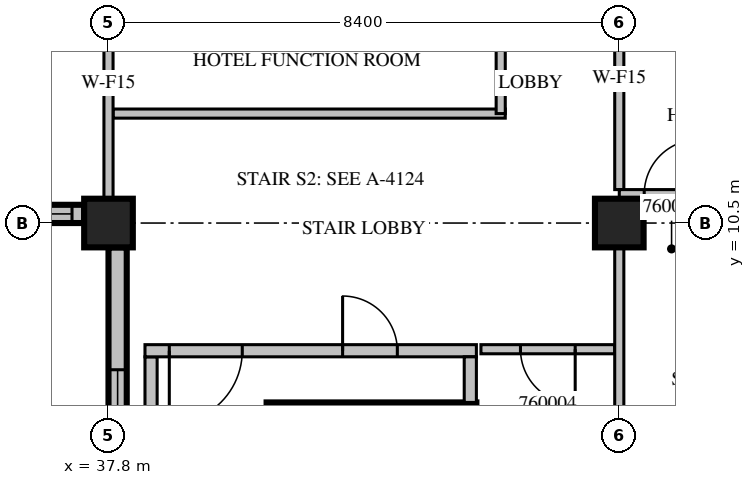
"""IFC4 building model, lengths in metres.
Left out: names, types, materials, properties, quantities, classifications, styles, units other than length and angle.
Written with IfcOpenShell. Run it as: python <this file> out.ifc"""

import sys

from ifc_helpers import new_model, si_unit, direction, frame, frame_2d, origin, origin_2d, place, context, subcontext, project, spatial, rectangle, extrude, source, transform, mapped, element, fill, save


model = new_model("IFC4")
c1 = context("Model", 3, precision=1e-05, world=origin(), true_north=direction((0.0, 1.0)))
c2 = subcontext(c1, "Body", "Model", "MODEL_VIEW")
j1 = project(units=[si_unit("LENGTHUNIT", "METRE"), si_unit("PLANEANGLEUNIT", "RADIAN")], contexts=[c1])
p1 = place(None, origin())
s1 = spatial("IfcSite", under=j1, at=p1, CompositionType="ELEMENT")
p2 = place(p1, origin())
s2 = spatial("IfcBuilding", under=s1, at=p2, CompositionType="ELEMENT")
p3 = place(p2, frame((0.0, 0.0, 261.4)))
s3 = spatial("IfcBuildingStorey", under=s2, at=p3, CompositionType="ELEMENT", Elevation=261.4)
m1 = source(origin(), c2, "Body", "SweptSolid", [
    extrude(rectangle(XDim=0.8, YDim=0.8, at=origin_2d()), origin(), (0.0, 0.0, 1.0), 3.8),
])
for number, where, z_axis, x_axis in (
    (1, (37.8, 10.5, 0.0), (0.0, 0.0, 1.0), (1.0, 0.0, 0.0)),
    (2, (46.2, 10.5, 0.0), (0.0, 0.0, 1.0), (1.0, 0.0, 0.0)),
):
    element("IfcColumn", number, at=place(p3, frame(where, z_axis=z_axis, x_axis=x_axis)), inside=s3, PredefinedType="COLUMN", context=c2, shape_type="MappedRepresentation", body=[
        mapped(m1, transform((0.0, 0.0, 0.0), scale=1.0)),
    ])
m2 = source(origin(), c2, "Body", "SweptSolid", [
    extrude(rectangle(XDim=7.6, YDim=0.3, at=frame_2d((3.8, 0.0))), origin(), (0.0, 0.0, 1.0), 3.4),
])
p4 = place(p3, frame((29.8, 10.65, 0.0), z_axis=(0.0, 0.0, 1.0), x_axis=(1.0, 0.0, 0.0)))
e3 = element("IfcWall", 3, at=p4, inside=s3, PredefinedType="STANDARD", context=c2, shape_type="MappedRepresentation", body=[
    mapped(m2, transform((0.0, 0.0, 0.0), scale=1.0)),
])
m3 = source(origin(), c2, "Body", "SweptSolid", [
    extrude(rectangle(XDim=1.2, YDim=2.3, at=frame_2d((0.6, 1.15))), frame((0.0, 0.16, 0.0), z_axis=(0.0, -1.0, 0.0), x_axis=(1.0, 0.0, 0.0)), (0.0, 0.0, 1.0), 0.32),
])
p5 = place(p4, frame((1.601, 0.0, 0.6)))
e4 = element("IfcOpeningElement", 4, at=p5, cuts=e3, PredefinedType="OPENING", context=c2, shape_type="MappedRepresentation", body=[
    mapped(m3, transform((0.0, 0.0, 0.0), scale=1.0)),
])
m4 = source(origin(), c2, "Body", "SweptSolid", [
    extrude(rectangle(XDim=3.0, YDim=2.3, at=frame_2d((1.5, 1.15))), frame((0.0, 0.16, 0.0), z_axis=(0.0, -1.0, 0.0), x_axis=(1.0, 0.0, 0.0)), (0.0, 0.0, 1.0), 0.32),
])
p6 = place(p4, frame((4.4, 0.0, 0.6)))
e5 = element("IfcOpeningElement", 5, at=p6, cuts=e3, PredefinedType="OPENING", context=c2, shape_type="MappedRepresentation", body=[
    mapped(m4, transform((0.0, 0.0, 0.0), scale=1.0)),
])
m5 = source(origin(), c2, "Body", "SweptSolid", [
    extrude(rectangle(XDim=9.3, YDim=0.3, at=frame_2d((4.65, 0.0))), origin(), (0.0, 0.0, 1.0), 3.4),
])
p7 = place(p3, frame((37.95, 10.1, 0.0), z_axis=(0.0, 0.0, 1.0), x_axis=(0.0, -1.0, 0.0)))
e6 = element("IfcWall", 6, at=p7, inside=s3, PredefinedType="STANDARD", context=c2, shape_type="MappedRepresentation", body=[
    mapped(m5, transform((0.0, 0.0, 0.0), scale=1.0)),
])
m6 = source(origin(), c2, "Body", "SweptSolid", [
    extrude(rectangle(XDim=1.8, YDim=2.3, at=frame_2d((0.9, 1.15))), frame((0.0, 0.16, 0.0), z_axis=(0.0, -1.0, 0.0), x_axis=(1.0, 0.0, 0.0)), (0.0, 0.0, 1.0), 0.32),
])
p8 = place(p7, frame((2.013, 0.0, 0.6)))
e7 = element("IfcOpeningElement", 7, at=p8, cuts=e6, PredefinedType="OPENING", context=c2, shape_type="MappedRepresentation", body=[
    mapped(m6, transform((0.0, 0.0, 0.0), scale=1.0)),
])
p9 = place(p7, frame((5.975, 0.0, 0.6)))
e8 = element("IfcOpeningElement", 8, at=p9, cuts=e6, PredefinedType="OPENING", context=c2, shape_type="MappedRepresentation", body=[
    mapped(m4, transform((0.0, 0.0, 0.0), scale=1.0)),
])
m7 = source(origin(), c2, "Body", "SweptSolid", [
    extrude(rectangle(XDim=3.45, YDim=0.25, at=frame_2d((1.725, 0.0))), origin(), (0.0, 0.0, 1.0), 3.4),
])
p10 = place(p3, frame((40.4, 7.425, 0.0), z_axis=(0.0, 0.0, 1.0), x_axis=(1.0, 0.0, 0.0)))
e9 = element("IfcWall", 9, at=p10, inside=s3, PredefinedType="SOLIDWALL", context=c2, shape_type="MappedRepresentation", body=[
    mapped(m7, transform((0.0, 0.0, 0.0), scale=1.0)),
])
m8 = source(origin(), c2, "Body", "SweptSolid", [
    extrude(rectangle(XDim=8.0, YDim=0.2, at=frame_2d((4.0, 0.0))), origin(), (0.0, 0.0, 1.0), 3.4),
])
p11 = place(p3, frame((38.5, 0.3, 0.0), z_axis=(0.0, 0.0, 1.0), x_axis=(0.0, 1.0, 0.0)))
e10 = element("IfcWall", 10, at=p11, inside=s3, PredefinedType="PARTITIONING", context=c2, shape_type="MappedRepresentation", body=[
    mapped(m8, transform((0.0, 0.0, 0.0), scale=1.0)),
])
m9 = source(origin(), c2, "Body", "SweptSolid", [
    extrude(rectangle(XDim=5.45, YDim=0.2, at=frame_2d((2.725, 0.0))), origin(), (0.0, 0.0, 1.0), 3.4),
])
p12 = place(p3, frame((38.4, 8.4, 0.0), z_axis=(0.0, 0.0, 1.0), x_axis=(1.0, 0.0, 0.0)))
e11 = element("IfcWall", 11, at=p12, inside=s3, PredefinedType="PARTITIONING", context=c2, shape_type="MappedRepresentation", body=[
    mapped(m9, transform((0.0, 0.0, 0.0), scale=1.0)),
])
m10 = source(origin(), c2, "Body", "SweptSolid", [
    extrude(rectangle(XDim=1.2, YDim=2.1, at=frame_2d((0.6, 1.05))), frame((0.0, 0.11, 0.0), z_axis=(0.0, -1.0, 0.0), x_axis=(1.0, 0.0, 0.0)), (0.0, 0.0, 1.0), 0.22),
])
p13 = place(p12, frame((0.4, 0.0, 0.0)))
e12 = element("IfcOpeningElement", 12, at=p13, cuts=e11, PredefinedType="OPENING", context=c2, shape_type="MappedRepresentation", body=[
    mapped(m10, transform((0.0, 0.0, 0.0), scale=1.0)),
])
m11 = source(origin(), c2, "Body", "SweptSolid", [
    extrude(rectangle(XDim=0.9, YDim=2.1, at=frame_2d((0.45, 1.05))), frame((0.0, 0.11, 0.0), z_axis=(0.0, -1.0, 0.0), x_axis=(1.0, 0.0, 0.0)), (0.0, 0.0, 1.0), 0.22),
])
p14 = place(p12, frame((3.25, 0.0, 0.0)))
e13 = element("IfcOpeningElement", 13, at=p14, cuts=e11, PredefinedType="OPENING", context=c2, shape_type="MappedRepresentation", body=[
    mapped(m11, transform((0.0, 0.0, 0.0), scale=1.0)),
])
m12 = source(origin(), c2, "Body", "SweptSolid", [
    extrude(rectangle(XDim=0.75, YDim=0.2, at=frame_2d((0.375, 0.0))), origin(), (0.0, 0.0, 1.0), 3.4),
])
p15 = place(p3, frame((43.75, 7.55, 0.0), z_axis=(0.0, 0.0, 1.0), x_axis=(0.0, 1.0, 0.0)))
e14 = element("IfcWall", 14, at=p15, inside=s3, PredefinedType="PARTITIONING", context=c2, shape_type="MappedRepresentation", body=[
    mapped(m12, transform((0.0, 0.0, 0.0), scale=1.0)),
])
m13 = source(origin(), c2, "Body", "SweptSolid", [
    extrude(rectangle(XDim=6.45, YDim=0.15, at=frame_2d((3.225, 0.0))), origin(), (0.0, 0.0, 1.0), 3.4),
])
p16 = place(p3, frame((37.875, 12.3, 0.0), z_axis=(0.0, 0.0, 1.0), x_axis=(1.0, 0.0, 0.0)))
e15 = element("IfcWall", 15, at=p16, inside=s3, PredefinedType="PARTITIONING", context=c2, shape_type="MappedRepresentation", body=[
    mapped(m13, transform((0.0, 0.0, 0.0), scale=1.0)),
])
m14 = source(origin(), c2, "Body", "SweptSolid", [
    extrude(rectangle(XDim=2.475, YDim=0.15, at=frame_2d((1.238, 0.0))), origin(), (0.0, 0.0, 1.0), 3.4),
])
p17 = place(p3, frame((44.25, 12.3, 0.0), z_axis=(0.0, 0.0, 1.0), x_axis=(0.0, 1.0, 0.0)))
e16 = element("IfcWall", 16, at=p17, inside=s3, PredefinedType="PARTITIONING", context=c2, shape_type="MappedRepresentation", body=[
    mapped(m14, transform((0.0, 0.0, 0.0), scale=1.0)),
])
m15 = source(origin(), c2, "Body", "SweptSolid", [
    extrude(rectangle(XDim=2.2, YDim=0.15, at=frame_2d((1.1, 0.0))), origin(), (0.0, 0.0, 1.0), 3.4),
])
p18 = place(p3, frame((46.125, 8.425, 0.0), z_axis=(0.0, 0.0, 1.0), x_axis=(-1.0, 0.0, 0.0)))
e17 = element("IfcWall", 17, at=p18, inside=s3, PredefinedType="PARTITIONING", context=c2, shape_type="MappedRepresentation", body=[
    mapped(m15, transform((0.0, 0.0, 0.0), scale=1.0)),
])
m16 = source(origin(), c2, "Body", "SweptSolid", [
    extrude(rectangle(XDim=0.9, YDim=2.1, at=frame_2d((0.45, 1.05))), frame((0.0, 0.085, 0.0), z_axis=(0.0, -1.0, 0.0), x_axis=(1.0, 0.0, 0.0)), (0.0, 0.0, 1.0), 0.17),
])
p19 = place(p18, frame((0.65, 0.0, 0.0)))
e18 = element("IfcOpeningElement", 18, at=p19, cuts=e17, PredefinedType="OPENING", context=c2, shape_type="MappedRepresentation", body=[
    mapped(m16, transform((0.0, 0.0, 0.0), scale=1.0)),
])
m17 = source(origin(), c2, "Body", "SweptSolid", [
    extrude(rectangle(XDim=3.801, YDim=0.15, at=frame_2d((1.901, 0.0))), origin(), (0.0, 0.0, 1.0), 3.4),
])
p20 = place(p3, frame((37.8, 10.899, 0.0), z_axis=(0.0, 0.0, 1.0), x_axis=(0.0, 1.0, 0.0)))
e19 = element("IfcWall", 19, at=p20, inside=s3, PredefinedType="PARTITIONING", context=c2, shape_type="MappedRepresentation", body=[
    mapped(m17, transform((0.0, 0.0, 0.0), scale=1.0)),
])
m18 = source(origin(), c2, "Body", "SweptSolid", [
    extrude(rectangle(XDim=9.302, YDim=0.15, at=frame_2d((4.651, 0.0))), origin(), (0.0, 0.0, 1.0), 3.4),
])
p21 = place(p3, frame((46.2, 0.799, 0.0), z_axis=(0.0, 0.0, 1.0), x_axis=(0.0, 1.0, 0.0)))
e20 = element("IfcWall", 20, at=p21, inside=s3, PredefinedType="PARTITIONING", context=c2, shape_type="MappedRepresentation", body=[
    mapped(m18, transform((0.0, 0.0, 0.0), scale=1.0)),
])
m19 = source(origin(), c2, "Body", "SweptSolid", [
    extrude(rectangle(XDim=3.65, YDim=0.15, at=frame_2d((1.825, 0.0))), origin(), (0.0, 0.0, 1.0), 3.4),
])
p22 = place(p3, frame((46.2, 11.05, 0.0), z_axis=(0.0, 0.0, 1.0), x_axis=(0.0, 1.0, 0.0)))
e21 = element("IfcWall", 21, at=p22, inside=s3, PredefinedType="PARTITIONING", context=c2, shape_type="MappedRepresentation", body=[
    mapped(m19, transform((0.0, 0.0, 0.0), scale=1.0)),
])
m20 = source(origin(), c2, "Body", "SweptSolid", [
    extrude(rectangle(XDim=7.26, YDim=0.15, at=frame_2d((3.63, 0.0))), origin(), (0.0, 0.0, 1.0), 3.4),
])
p23 = place(p3, frame((53.46, 10.975, 0.0), z_axis=(0.0, 0.0, 1.0), x_axis=(-1.0, 0.0, 0.0)))
e22 = element("IfcWall", 22, at=p23, inside=s3, PredefinedType="PARTITIONING", context=c2, shape_type="MappedRepresentation", body=[
    mapped(m20, transform((0.0, 0.0, 0.0), scale=1.0)),
])
p24 = place(p23, frame((4.999, 0.0, 0.0)))
e23 = element("IfcOpeningElement", 23, at=p24, cuts=e22, PredefinedType="OPENING", context=c2, shape_type="MappedRepresentation", body=[
    mapped(m16, transform((0.0, 0.0, 0.0), scale=1.0)),
])
p25 = place(p23, frame((5.95, 0.0, 0.0)))
e24 = element("IfcOpeningElement", 24, at=p25, cuts=e22, PredefinedType="OPENING", context=c2, shape_type="MappedRepresentation", body=[
    mapped(m16, transform((0.0, 0.0, 0.0), scale=1.0)),
])
p26 = place(p23, frame((2.264, 0.0, 0.0)))
e25 = element("IfcOpeningElement", 25, at=p26, cuts=e22, PredefinedType="OPENING", context=c2, shape_type="MappedRepresentation", body=[
    mapped(m16, transform((0.0, 0.0, 0.0), scale=1.0)),
])
m21 = source(origin(), c2, "Body", "SweptSolid", [
    extrude(rectangle(XDim=3.0, YDim=2.3, at=frame_2d((1.5, 1.15))), frame((0.0, 0.03, 0.0), z_axis=(0.0, -1.0, 0.0), x_axis=(1.0, 0.0, 0.0)), (0.0, 0.0, 1.0), 0.06),
])
p27 = place(p6, origin())
e26 = element("IfcWindow", 26, at=p27, inside=s3, PartitioningType="SINGLE_PANEL", PredefinedType="WINDOW", context=c2, shape_type="MappedRepresentation", body=[
    mapped(m21, transform((0.0, 0.0, 0.0), scale=1.0)),
])
fill(e5, e26)
m22 = source(origin(), c2, "Body", "SweptSolid", [
    extrude(rectangle(XDim=1.8, YDim=2.3, at=frame_2d((0.9, 1.15))), frame((0.0, 0.03, 0.0), z_axis=(0.0, -1.0, 0.0), x_axis=(1.0, 0.0, 0.0)), (0.0, 0.0, 1.0), 0.06),
])
p28 = place(p8, origin())
e27 = element("IfcWindow", 27, at=p28, inside=s3, PartitioningType="SINGLE_PANEL", PredefinedType="WINDOW", context=c2, shape_type="MappedRepresentation", body=[
    mapped(m22, transform((0.0, 0.0, 0.0), scale=1.0)),
])
fill(e7, e27)
m23 = source(origin(), c2, "Body", "SweptSolid", [
    extrude(rectangle(XDim=1.2, YDim=2.1, at=frame_2d((0.6, 1.05))), frame((0.0, 0.025, 0.0), z_axis=(0.0, -1.0, 0.0), x_axis=(1.0, 0.0, 0.0)), (0.0, 0.0, 1.0), 0.05),
])
p29 = place(p13, origin())
e28 = element("IfcDoor", 28, at=p29, inside=s3, OperationType="SINGLE_SWING_RIGHT", PredefinedType="DOOR", context=c2, shape_type="MappedRepresentation", body=[
    mapped(m23, transform((0.0, 0.0, 0.0), scale=1.0)),
])
fill(e12, e28)
m24 = source(origin(), c2, "Body", "SweptSolid", [
    extrude(rectangle(XDim=0.9, YDim=2.1, at=frame_2d((0.45, 1.05))), frame((0.0, 0.025, 0.0), z_axis=(0.0, -1.0, 0.0), x_axis=(1.0, 0.0, 0.0)), (0.0, 0.0, 1.0), 0.05),
])
p30 = place(p14, origin())
e29 = element("IfcDoor", 29, at=p30, inside=s3, OperationType="SINGLE_SWING_LEFT", PredefinedType="DOOR", context=c2, shape_type="MappedRepresentation", body=[
    mapped(m24, transform((0.0, 0.0, 0.0), scale=1.0)),
])
fill(e13, e29)
p31 = place(p19, origin())
e30 = element("IfcDoor", 30, at=p31, inside=s3, OperationType="SINGLE_SWING_LEFT", PredefinedType="DOOR", context=c2, shape_type="MappedRepresentation", body=[
    mapped(m24, transform((0.0, 0.0, 0.0), scale=1.0)),
])
fill(e18, e30)
p32 = place(p25, origin())
e31 = element("IfcDoor", 31, at=p32, inside=s3, OperationType="SINGLE_SWING_RIGHT", PredefinedType="DOOR", context=c2, shape_type="MappedRepresentation", body=[
    mapped(m24, transform((0.0, 0.0, 0.0), scale=1.0)),
])
fill(e24, e31)
save(model, sys.argv[1])
